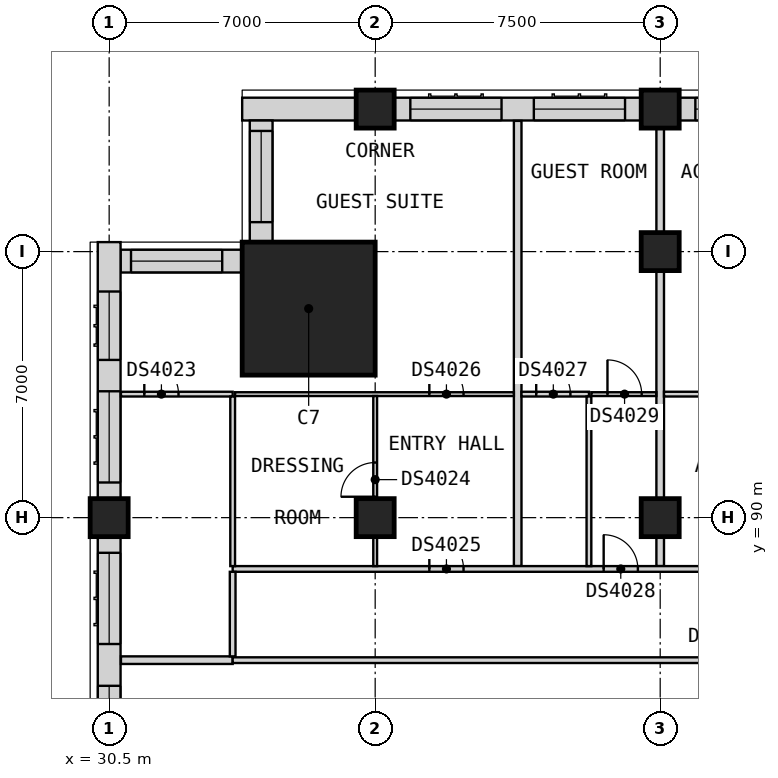
"""IFC4 building model, lengths in metres.
Left out: names, types, materials, properties, quantities, classifications, styles, units other than length and angle.
Written with IfcOpenShell. Run it as: python <this file> out.ifc"""

import sys

from ifc_helpers import new_model, si_unit, direction, frame, frame_2d, origin, origin_2d, place, context, subcontext, project, spatial, rectangle, extrude, element, fill, save


model = new_model("IFC4")
c1 = context("Model", 3, precision=1e-05, world=origin(), true_north=direction((0.0, 1.0)))
c2 = subcontext(c1, "Body", "Model", "MODEL_VIEW")
j1 = project(units=[si_unit("LENGTHUNIT", "METRE"), si_unit("PLANEANGLEUNIT", "RADIAN")], contexts=[c1])
p1 = place(None, origin())
s1 = spatial("IfcSite", under=j1, at=p1, CompositionType="ELEMENT")
p2 = place(p1, origin())
s2 = spatial("IfcBuilding", under=s1, at=p2, CompositionType="ELEMENT")
p3 = place(p2, frame((0.0, 0.0, 141.0)))
s3 = spatial("IfcBuildingStorey", under=s2, at=p3, CompositionType="ELEMENT", Elevation=141.0)
for number, where, z_axis, x_axis in (
    (1, (37.5, 100.75, 0.0), (0.0, 0.0, 1.0), (1.0, 0.0, 0.0)),
    (2, (45.0, 100.75, 0.0), (0.0, 0.0, 1.0), (1.0, 0.0, 0.0)),
    (3, (30.5, 90.0, 0.0), (0.0, 0.0, 1.0), (1.0, 0.0, 0.0)),
    (4, (37.5, 90.0, 0.0), (0.0, 0.0, 1.0), (1.0, 0.0, 0.0)),
    (5, (45.0, 90.0, 0.0), (0.0, 0.0, 1.0), (1.0, 0.0, 0.0)),
    (6, (45.0, 97.0, 0.0), (0.0, 0.0, 1.0), (1.0, 0.0, 0.0)),
):
    element("IfcColumn", number, at=place(p3, frame(where, z_axis=z_axis, x_axis=x_axis)), inside=s3, PredefinedType="COLUMN", context=c2, shape_type="SweptSolid", body=[
        extrude(rectangle(XDim=1.0, YDim=1.0, at=origin_2d()), origin(), (0.0, 0.0, 1.0), 3.6),
    ])
p4 = place(p3, frame((35.75, 95.5, 0.0), z_axis=(0.0, 0.0, 1.0), x_axis=(1.0, 0.0, 0.0)))
e7 = element("IfcColumn", 7, at=p4, inside=s3, PredefinedType="COLUMN", context=c2, shape_type="SweptSolid", body=[
    extrude(rectangle(XDim=3.5, YDim=3.5, at=origin_2d()), origin(), (0.0, 0.0, 1.0), 3.6),
])
p5 = place(p3, frame((52.0, 100.75, 0.0), z_axis=(0.0, 0.0, 1.0), x_axis=(-1.0, 0.0, 0.0)))
e8 = element("IfcWall", 8, at=p5, inside=s3, PredefinedType="SOLIDWALL", context=c2, shape_type="SweptSolid", body=[
    extrude(rectangle(XDim=6.5, YDim=0.6, at=frame_2d((3.25, 0.0))), origin(), (0.0, 0.0, 1.0), 2.85),
])
p6 = place(p5, frame((3.675, 0.0, 0.8)))
e9 = element("IfcOpeningElement", 9, at=p6, cuts=e8, PredefinedType="OPENING", context=c2, shape_type="SweptSolid", body=[
    extrude(rectangle(XDim=2.4, YDim=1.8, at=frame_2d((1.2, 0.9))), frame((0.0, 0.31, 0.0), z_axis=(0.0, -1.0, 0.0), x_axis=(1.0, 0.0, 0.0)), (0.0, 0.0, 1.0), 0.62),
])
p7 = place(p5, frame((0.425, 0.0, 0.8)))
e10 = element("IfcOpeningElement", 10, at=p7, cuts=e8, PredefinedType="OPENING", context=c2, shape_type="SweptSolid", body=[
    extrude(rectangle(XDim=2.4, YDim=1.8, at=frame_2d((1.2, 0.9))), frame((0.0, 0.31, 0.0), z_axis=(0.0, -1.0, 0.0), x_axis=(1.0, 0.0, 0.0)), (0.0, 0.0, 1.0), 0.62),
])
p8 = place(p3, frame((44.5, 100.75, 0.0), z_axis=(0.0, 0.0, 1.0), x_axis=(-1.0, 0.0, 0.0)))
e11 = element("IfcWall", 11, at=p8, inside=s3, PredefinedType="SOLIDWALL", context=c2, shape_type="SweptSolid", body=[
    extrude(rectangle(XDim=6.5, YDim=0.6, at=frame_2d((3.25, 0.0))), origin(), (0.0, 0.0, 1.0), 2.85),
])
p9 = place(p8, frame((3.675, 0.0, 0.8)))
e12 = element("IfcOpeningElement", 12, at=p9, cuts=e11, PredefinedType="OPENING", context=c2, shape_type="SweptSolid", body=[
    extrude(rectangle(XDim=2.4, YDim=1.8, at=frame_2d((1.2, 0.9))), frame((0.0, 0.31, 0.0), z_axis=(0.0, -1.0, 0.0), x_axis=(1.0, 0.0, 0.0)), (0.0, 0.0, 1.0), 0.62),
])
p10 = place(p8, frame((0.425, 0.0, 0.8)))
e13 = element("IfcOpeningElement", 13, at=p10, cuts=e11, PredefinedType="OPENING", context=c2, shape_type="SweptSolid", body=[
    extrude(rectangle(XDim=2.4, YDim=1.8, at=frame_2d((1.2, 0.9))), frame((0.0, 0.31, 0.0), z_axis=(0.0, -1.0, 0.0), x_axis=(1.0, 0.0, 0.0)), (0.0, 0.0, 1.0), 0.62),
])
p11 = place(p3, frame((37.0, 100.75, 0.0), z_axis=(0.0, 0.0, 1.0), x_axis=(-1.0, 0.0, 0.0)))
e14 = element("IfcWall", 14, at=p11, inside=s3, PredefinedType="SOLIDWALL", context=c2, shape_type="SweptSolid", body=[
    extrude(rectangle(XDim=3.0, YDim=0.6, at=frame_2d((1.5, 0.0))), origin(), (0.0, 0.0, 1.0), 3.35),
])
p12 = place(p3, frame((34.5, 100.45, 0.0), z_axis=(0.0, 0.0, 1.0), x_axis=(0.0, -1.0, 0.0)))
e15 = element("IfcWall", 15, at=p12, inside=s3, PredefinedType="SOLIDWALL", context=c2, shape_type="SweptSolid", body=[
    extrude(rectangle(XDim=3.2, YDim=0.6, at=frame_2d((1.6, 0.0))), origin(), (0.0, 0.0, 1.0), 3.35),
])
p13 = place(p12, frame((0.275, 0.0, 0.8)))
e16 = element("IfcOpeningElement", 16, at=p13, cuts=e15, PredefinedType="OPENING", context=c2, shape_type="SweptSolid", body=[
    extrude(rectangle(XDim=2.4, YDim=1.8, at=frame_2d((1.2, 0.9))), frame((0.0, 0.31, 0.0), z_axis=(0.0, -1.0, 0.0), x_axis=(1.0, 0.0, 0.0)), (0.0, 0.0, 1.0), 0.62),
])
p14 = place(p3, frame((34.0, 96.75, 0.0), z_axis=(0.0, 0.0, 1.0), x_axis=(-1.0, 0.0, 0.0)))
e17 = element("IfcWall", 17, at=p14, inside=s3, PredefinedType="SOLIDWALL", context=c2, shape_type="SweptSolid", body=[
    extrude(rectangle(XDim=3.2, YDim=0.6, at=frame_2d((1.6, 0.0))), origin(), (0.0, 0.0, 1.0), 3.35),
])
p15 = place(p14, frame((0.525, 0.0, 0.8)))
e18 = element("IfcOpeningElement", 18, at=p15, cuts=e17, PredefinedType="OPENING", context=c2, shape_type="SweptSolid", body=[
    extrude(rectangle(XDim=2.4, YDim=1.8, at=frame_2d((1.2, 0.9))), frame((0.0, 0.31, 0.0), z_axis=(0.0, -1.0, 0.0), x_axis=(1.0, 0.0, 0.0)), (0.0, 0.0, 1.0), 0.62),
])
p16 = place(p3, frame((30.5, 97.25, 0.0), z_axis=(0.0, 0.0, 1.0), x_axis=(0.0, -1.0, 0.0)))
e19 = element("IfcWall", 19, at=p16, inside=s3, PredefinedType="SOLIDWALL", context=c2, shape_type="SweptSolid", body=[
    extrude(rectangle(XDim=6.75, YDim=0.6, at=frame_2d((3.375, 0.0))), origin(), (0.0, 0.0, 1.0), 2.85),
])
p17 = place(p16, frame((3.925, 0.0, 0.8)))
e20 = element("IfcOpeningElement", 20, at=p17, cuts=e19, PredefinedType="OPENING", context=c2, shape_type="SweptSolid", body=[
    extrude(rectangle(XDim=2.4, YDim=1.8, at=frame_2d((1.2, 0.9))), frame((0.0, 0.31, 0.0), z_axis=(0.0, -1.0, 0.0), x_axis=(1.0, 0.0, 0.0)), (0.0, 0.0, 1.0), 0.62),
])
p18 = place(p16, frame((1.3, 0.0, 0.8)))
e21 = element("IfcOpeningElement", 21, at=p18, cuts=e19, PredefinedType="OPENING", context=c2, shape_type="SweptSolid", body=[
    extrude(rectangle(XDim=1.8, YDim=1.8, at=frame_2d((0.9, 0.9))), frame((0.0, 0.31, 0.0), z_axis=(0.0, -1.0, 0.0), x_axis=(1.0, 0.0, 0.0)), (0.0, 0.0, 1.0), 0.62),
])
p19 = place(p3, frame((30.5, 89.5, 0.0), z_axis=(0.0, 0.0, 1.0), x_axis=(0.0, -1.0, 0.0)))
e22 = element("IfcWall", 22, at=p19, inside=s3, PredefinedType="SOLIDWALL", context=c2, shape_type="SweptSolid", body=[
    extrude(rectangle(XDim=7.0, YDim=0.6, at=frame_2d((3.5, 0.0))), origin(), (0.0, 0.0, 1.0), 3.35),
])
p20 = place(p19, frame((3.925, 0.0, 0.8)))
e23 = element("IfcOpeningElement", 23, at=p20, cuts=e22, PredefinedType="OPENING", context=c2, shape_type="SweptSolid", body=[
    extrude(rectangle(XDim=2.4, YDim=1.8, at=frame_2d((1.2, 0.9))), frame((0.0, 0.31, 0.0), z_axis=(0.0, -1.0, 0.0), x_axis=(1.0, 0.0, 0.0)), (0.0, 0.0, 1.0), 0.62),
])
p21 = place(p19, frame((0.425, 0.0, 0.8)))
e24 = element("IfcOpeningElement", 24, at=p21, cuts=e22, PredefinedType="OPENING", context=c2, shape_type="SweptSolid", body=[
    extrude(rectangle(XDim=2.4, YDim=1.8, at=frame_2d((1.2, 0.9))), frame((0.0, 0.31, 0.0), z_axis=(0.0, -1.0, 0.0), x_axis=(1.0, 0.0, 0.0)), (0.0, 0.0, 1.0), 0.62),
])
p22 = place(p3, frame((30.81, 86.25, 0.0), z_axis=(0.0, 0.0, 1.0), x_axis=(1.0, 0.0, 0.0)))
e25 = element("IfcWall", 25, at=p22, inside=s3, PredefinedType="PARTITIONING", context=c2, shape_type="SweptSolid", body=[
    extrude(rectangle(XDim=2.94, YDim=0.2, at=frame_2d((1.47, 0.0))), origin(), (0.0, 0.0, 1.0), 3.35),
])
p23 = place(p3, frame((41.25, 88.725, 0.0), z_axis=(0.0, 0.0, 1.0), x_axis=(0.0, 1.0, 0.0)))
e26 = element("IfcWall", 26, at=p23, inside=s3, PredefinedType="PARTITIONING", context=c2, shape_type="SweptSolid", body=[
    extrude(rectangle(XDim=11.715, YDim=0.2, at=frame_2d((5.857, 0.0))), origin(), (0.0, 0.0, 1.0), 3.35),
])
p24 = place(p3, frame((45.0, 88.725, 0.0), z_axis=(0.0, 0.0, 1.0), x_axis=(0.0, 1.0, 0.0)))
e27 = element("IfcWall", 27, at=p24, inside=s3, PredefinedType="PARTITIONING", context=c2, shape_type="SweptSolid", body=[
    extrude(rectangle(XDim=12.525, YDim=0.2, at=frame_2d((6.262, 0.0))), origin(), (0.0, 0.0, 1.0), 3.35),
])
p25 = place(p3, frame((33.75, 86.25, 0.0), z_axis=(0.0, 0.0, 1.0), x_axis=(1.0, 0.0, 0.0)))
e28 = element("IfcWall", 28, at=p25, inside=s3, PredefinedType="PARTITIONING", context=c2, shape_type="SweptSolid", body=[
    extrude(rectangle(XDim=37.5, YDim=0.15, at=frame_2d((18.75, 0.0))), origin(), (0.0, 0.0, 1.0), 3.35),
])
p26 = place(p25, frame((12.45, 0.0, 0.0)))
e29 = element("IfcOpeningElement", 29, at=p26, cuts=e28, PredefinedType="OPENING", context=c2, shape_type="SweptSolid", body=[
    extrude(rectangle(XDim=0.9, YDim=2.1, at=frame_2d((0.45, 1.05))), frame((0.0, 0.085, 0.0), z_axis=(0.0, -1.0, 0.0), x_axis=(1.0, 0.0, 0.0)), (0.0, 0.0, 1.0), 0.17),
])
p27 = place(p25, frame((27.225, 0.0, 0.0)))
e30 = element("IfcOpeningElement", 30, at=p27, cuts=e28, PredefinedType="OPENING", context=c2, shape_type="SweptSolid", body=[
    extrude(rectangle(XDim=0.9, YDim=2.1, at=frame_2d((0.45, 1.05))), frame((0.0, 0.085, 0.0), z_axis=(0.0, -1.0, 0.0), x_axis=(1.0, 0.0, 0.0)), (0.0, 0.0, 1.0), 0.17),
])
p28 = place(p3, frame((33.75, 88.65, 0.0), z_axis=(0.0, 0.0, 1.0), x_axis=(1.0, 0.0, 0.0)))
e31 = element("IfcWall", 31, at=p28, inside=s3, PredefinedType="PARTITIONING", context=c2, shape_type="SweptSolid", body=[
    extrude(rectangle(XDim=39.9, YDim=0.15, at=frame_2d((19.95, 0.0))), origin(), (0.0, 0.0, 1.0), 3.35),
])
p29 = place(p28, frame((5.175, 0.0, 0.0)))
e32 = element("IfcOpeningElement", 32, at=p29, cuts=e31, PredefinedType="OPENING", context=c2, shape_type="SweptSolid", body=[
    extrude(rectangle(XDim=0.9, YDim=2.1, at=frame_2d((0.45, 1.05))), frame((0.0, 0.085, 0.0), z_axis=(0.0, -1.0, 0.0), x_axis=(1.0, 0.0, 0.0)), (0.0, 0.0, 1.0), 0.17),
])
p30 = place(p28, frame((9.762, 0.0, 0.0)))
e33 = element("IfcOpeningElement", 33, at=p30, cuts=e31, PredefinedType="OPENING", context=c2, shape_type="SweptSolid", body=[
    extrude(rectangle(XDim=0.9, YDim=2.1, at=frame_2d((0.45, 1.05))), frame((0.0, 0.085, 0.0), z_axis=(0.0, -1.0, 0.0), x_axis=(1.0, 0.0, 0.0)), (0.0, 0.0, 1.0), 0.17),
])
p31 = place(p28, frame((16.938, 0.0, 0.0)))
e34 = element("IfcOpeningElement", 34, at=p31, cuts=e31, PredefinedType="OPENING", context=c2, shape_type="SweptSolid", body=[
    extrude(rectangle(XDim=1.0, YDim=2.1, at=frame_2d((0.5, 1.05))), frame((0.0, 0.085, 0.0), z_axis=(0.0, -1.0, 0.0), x_axis=(1.0, 0.0, 0.0)), (0.0, 0.0, 1.0), 0.17),
])
p32 = place(p28, frame((24.3, 0.0, 0.0)))
e35 = element("IfcOpeningElement", 35, at=p32, cuts=e31, PredefinedType="OPENING", context=c2, shape_type="SweptSolid", body=[
    extrude(rectangle(XDim=0.9, YDim=2.1, at=frame_2d((0.45, 1.05))), frame((0.0, 0.085, 0.0), z_axis=(0.0, -1.0, 0.0), x_axis=(1.0, 0.0, 0.0)), (0.0, 0.0, 1.0), 0.17),
])
p33 = place(p28, frame((36.113, 0.0, 0.0)))
e36 = element("IfcOpeningElement", 36, at=p33, cuts=e31, PredefinedType="OPENING", context=c2, shape_type="SweptSolid", body=[
    extrude(rectangle(XDim=0.9, YDim=2.1, at=frame_2d((0.45, 1.05))), frame((0.0, 0.085, 0.0), z_axis=(0.0, -1.0, 0.0), x_axis=(1.0, 0.0, 0.0)), (0.0, 0.0, 1.0), 0.17),
])
p34 = place(p28, frame((38.25, 0.0, 0.0)))
e37 = element("IfcOpeningElement", 37, at=p34, cuts=e31, PredefinedType="OPENING", context=c2, shape_type="SweptSolid", body=[
    extrude(rectangle(XDim=0.9, YDim=2.1, at=frame_2d((0.45, 1.05))), frame((0.0, 0.085, 0.0), z_axis=(0.0, -1.0, 0.0), x_axis=(1.0, 0.0, 0.0)), (0.0, 0.0, 1.0), 0.17),
])
p35 = place(p3, frame((33.75, 86.35, 0.0), z_axis=(0.0, 0.0, 1.0), x_axis=(0.0, 1.0, 0.0)))
e38 = element("IfcWall", 38, at=p35, inside=s3, PredefinedType="PARTITIONING", context=c2, shape_type="SweptSolid", body=[
    extrude(rectangle(XDim=2.225, YDim=0.15, at=frame_2d((1.112, 0.0))), origin(), (0.0, 0.0, 1.0), 3.35),
])
p36 = place(p3, frame((33.812, 93.25, 0.0), z_axis=(0.0, 0.0, 1.0), x_axis=(1.0, 0.0, 0.0)))
e39 = element("IfcWall", 39, at=p36, inside=s3, PredefinedType="PARTITIONING", context=c2, shape_type="SweptSolid", body=[
    extrude(rectangle(XDim=7.337, YDim=0.1, at=frame_2d((3.669, 0.0))), origin(), (0.0, 0.0, 1.0), 3.35),
])
p37 = place(p36, frame((5.113, 0.0, 0.0)))
e40 = element("IfcOpeningElement", 40, at=p37, cuts=e39, PredefinedType="OPENING", context=c2, shape_type="SweptSolid", body=[
    extrude(rectangle(XDim=0.9, YDim=2.1, at=frame_2d((0.45, 1.05))), frame((0.0, 0.06, 0.0), z_axis=(0.0, -1.0, 0.0), x_axis=(1.0, 0.0, 0.0)), (0.0, 0.0, 1.0), 0.12),
])
p38 = place(p3, frame((43.188, 93.25, 0.0), z_axis=(0.0, 0.0, 1.0), x_axis=(1.0, 0.0, 0.0)))
e41 = element("IfcWall", 41, at=p38, inside=s3, PredefinedType="PARTITIONING", context=c2, shape_type="SweptSolid", body=[
    extrude(rectangle(XDim=1.712, YDim=0.1, at=frame_2d((0.856, 0.0))), origin(), (0.0, 0.0, 1.0), 3.35),
])
p39 = place(p38, frame((0.425, 0.0, 0.0)))
e42 = element("IfcOpeningElement", 42, at=p39, cuts=e41, PredefinedType="OPENING", context=c2, shape_type="SweptSolid", body=[
    extrude(rectangle(XDim=0.9, YDim=2.1, at=frame_2d((0.45, 1.05))), frame((0.0, 0.06, 0.0), z_axis=(0.0, -1.0, 0.0), x_axis=(1.0, 0.0, 0.0)), (0.0, 0.0, 1.0), 0.12),
])
p40 = place(p3, frame((37.5, 88.725, 0.0), z_axis=(0.0, 0.0, 1.0), x_axis=(0.0, 1.0, 0.0)))
e43 = element("IfcWall", 43, at=p40, inside=s3, PredefinedType="PARTITIONING", context=c2, shape_type="SweptSolid", body=[
    extrude(rectangle(XDim=4.475, YDim=0.1, at=frame_2d((2.237, 0.0))), origin(), (0.0, 0.0, 1.0), 3.35),
])
p41 = place(p40, frame((1.825, 0.0, 0.0)))
e44 = element("IfcOpeningElement", 44, at=p41, cuts=e43, PredefinedType="OPENING", context=c2, shape_type="SweptSolid", body=[
    extrude(rectangle(XDim=0.9, YDim=2.1, at=frame_2d((0.45, 1.05))), frame((0.0, 0.06, 0.0), z_axis=(0.0, -1.0, 0.0), x_axis=(1.0, 0.0, 0.0)), (0.0, 0.0, 1.0), 0.12),
])
p42 = place(p3, frame((30.81, 93.25, 0.0), z_axis=(0.0, 0.0, 1.0), x_axis=(1.0, 0.0, 0.0)))
e45 = element("IfcWall", 45, at=p42, inside=s3, PredefinedType="PARTITIONING", context=c2, shape_type="SweptSolid", body=[
    extrude(rectangle(XDim=2.94, YDim=0.125, at=frame_2d((1.47, 0.0))), origin(), (0.0, 0.0, 1.0), 3.35),
])
p43 = place(p42, frame((0.615, 0.0, 0.0)))
e46 = element("IfcOpeningElement", 46, at=p43, cuts=e45, PredefinedType="OPENING", context=c2, shape_type="SweptSolid", body=[
    extrude(rectangle(XDim=0.9, YDim=2.1, at=frame_2d((0.45, 1.05))), frame((0.0, 0.073, 0.0), z_axis=(0.0, -1.0, 0.0), x_axis=(1.0, 0.0, 0.0)), (0.0, 0.0, 1.0), 0.145),
])
p44 = place(p3, frame((41.35, 93.25, 0.0), z_axis=(0.0, 0.0, 1.0), x_axis=(1.0, 0.0, 0.0)))
e47 = element("IfcWall", 47, at=p44, inside=s3, PredefinedType="PARTITIONING", context=c2, shape_type="SweptSolid", body=[
    extrude(rectangle(XDim=1.775, YDim=0.125, at=frame_2d((0.887, 0.0))), origin(), (0.0, 0.0, 1.0), 3.35),
])
p45 = place(p44, frame((0.387, 0.0, 0.0)))
e48 = element("IfcOpeningElement", 48, at=p45, cuts=e47, PredefinedType="OPENING", context=c2, shape_type="SweptSolid", body=[
    extrude(rectangle(XDim=0.9, YDim=2.1, at=frame_2d((0.45, 1.05))), frame((0.0, 0.073, 0.0), z_axis=(0.0, -1.0, 0.0), x_axis=(1.0, 0.0, 0.0)), (0.0, 0.0, 1.0), 0.145),
])
p46 = place(p3, frame((45.1, 93.25, 0.0), z_axis=(0.0, 0.0, 1.0), x_axis=(1.0, 0.0, 0.0)))
e49 = element("IfcWall", 49, at=p46, inside=s3, PredefinedType="PARTITIONING", context=c2, shape_type="SweptSolid", body=[
    extrude(rectangle(XDim=4.775, YDim=0.125, at=frame_2d((2.387, 0.0))), origin(), (0.0, 0.0, 1.0), 3.35),
])
p47 = place(p46, frame((1.837, 0.0, 0.0)))
e50 = element("IfcOpeningElement", 50, at=p47, cuts=e49, PredefinedType="OPENING", context=c2, shape_type="SweptSolid", body=[
    extrude(rectangle(XDim=1.0, YDim=2.1, at=frame_2d((0.5, 1.05))), frame((0.0, 0.073, 0.0), z_axis=(0.0, -1.0, 0.0), x_axis=(1.0, 0.0, 0.0)), (0.0, 0.0, 1.0), 0.145),
])
for number, where, z_axis, x_axis in (
    (51, (33.75, 88.725, 0.0), (0.0, 0.0, 1.0), (0.0, 1.0, 0.0)),
    (52, (43.125, 88.725, 0.0), (0.0, 0.0, 1.0), (0.0, 1.0, 0.0)),
):
    element("IfcWall", number, at=place(p3, frame(where, z_axis=z_axis, x_axis=x_axis)), inside=s3, PredefinedType="PARTITIONING", context=c2, shape_type="SweptSolid", body=[
        extrude(rectangle(XDim=4.462, YDim=0.125, at=frame_2d((2.231, 0.0))), origin(), (0.0, 0.0, 1.0), 3.35),
    ])
p48 = place(p6, origin())
e53 = element("IfcWindow", 53, at=p48, inside=s3, PartitioningType="SINGLE_PANEL", PredefinedType="WINDOW", context=c2, shape_type="SweptSolid", body=[
    extrude(rectangle(XDim=2.4, YDim=1.8, at=frame_2d((1.2, 0.9))), frame((0.0, -0.07, 0.0), z_axis=(0.0, -1.0, 0.0), x_axis=(1.0, 0.0, 0.0)), (0.0, 0.0, 1.0), 0.06),
])
fill(e9, e53)
p49 = place(p9, origin())
e54 = element("IfcWindow", 54, at=p49, inside=s3, PartitioningType="SINGLE_PANEL", PredefinedType="WINDOW", context=c2, shape_type="SweptSolid", body=[
    extrude(rectangle(XDim=2.4, YDim=1.8, at=frame_2d((1.2, 0.9))), frame((0.0, -0.07, 0.0), z_axis=(0.0, -1.0, 0.0), x_axis=(1.0, 0.0, 0.0)), (0.0, 0.0, 1.0), 0.06),
])
fill(e12, e54)
p50 = place(p10, origin())
e55 = element("IfcWindow", 55, at=p50, inside=s3, PartitioningType="SINGLE_PANEL", PredefinedType="WINDOW", context=c2, shape_type="SweptSolid", body=[
    extrude(rectangle(XDim=2.4, YDim=1.8, at=frame_2d((1.2, 0.9))), frame((0.0, -0.07, 0.0), z_axis=(0.0, -1.0, 0.0), x_axis=(1.0, 0.0, 0.0)), (0.0, 0.0, 1.0), 0.06),
])
fill(e13, e55)
p51 = place(p13, origin())
e56 = element("IfcWindow", 56, at=p51, inside=s3, PartitioningType="SINGLE_PANEL", PredefinedType="WINDOW", context=c2, shape_type="SweptSolid", body=[
    extrude(rectangle(XDim=2.4, YDim=1.8, at=frame_2d((1.2, 0.9))), frame((0.0, -0.07, 0.0), z_axis=(0.0, -1.0, 0.0), x_axis=(1.0, 0.0, 0.0)), (0.0, 0.0, 1.0), 0.06),
])
fill(e16, e56)
p52 = place(p15, origin())
e57 = element("IfcWindow", 57, at=p52, inside=s3, PartitioningType="SINGLE_PANEL", PredefinedType="WINDOW", context=c2, shape_type="SweptSolid", body=[
    extrude(rectangle(XDim=2.4, YDim=1.8, at=frame_2d((1.2, 0.9))), frame((0.0, -0.07, 0.0), z_axis=(0.0, -1.0, 0.0), x_axis=(1.0, 0.0, 0.0)), (0.0, 0.0, 1.0), 0.06),
])
fill(e18, e57)
p53 = place(p17, origin())
e58 = element("IfcWindow", 58, at=p53, inside=s3, PartitioningType="SINGLE_PANEL", PredefinedType="WINDOW", context=c2, shape_type="SweptSolid", body=[
    extrude(rectangle(XDim=2.4, YDim=1.8, at=frame_2d((1.2, 0.9))), frame((0.0, -0.07, 0.0), z_axis=(0.0, -1.0, 0.0), x_axis=(1.0, 0.0, 0.0)), (0.0, 0.0, 1.0), 0.06),
])
fill(e20, e58)
p54 = place(p18, origin())
e59 = element("IfcWindow", 59, at=p54, inside=s3, PartitioningType="SINGLE_PANEL", PredefinedType="WINDOW", context=c2, shape_type="SweptSolid", body=[
    extrude(rectangle(XDim=1.8, YDim=1.8, at=frame_2d((0.9, 0.9))), frame((0.0, -0.07, 0.0), z_axis=(0.0, -1.0, 0.0), x_axis=(1.0, 0.0, 0.0)), (0.0, 0.0, 1.0), 0.06),
])
fill(e21, e59)
p55 = place(p20, origin())
e60 = element("IfcWindow", 60, at=p55, inside=s3, PartitioningType="SINGLE_PANEL", PredefinedType="WINDOW", context=c2, shape_type="SweptSolid", body=[
    extrude(rectangle(XDim=2.4, YDim=1.8, at=frame_2d((1.2, 0.9))), frame((0.0, -0.07, 0.0), z_axis=(0.0, -1.0, 0.0), x_axis=(1.0, 0.0, 0.0)), (0.0, 0.0, 1.0), 0.06),
])
fill(e23, e60)
p56 = place(p21, origin())
e61 = element("IfcWindow", 61, at=p56, inside=s3, PartitioningType="SINGLE_PANEL", PredefinedType="WINDOW", context=c2, shape_type="SweptSolid", body=[
    extrude(rectangle(XDim=2.4, YDim=1.8, at=frame_2d((1.2, 0.9))), frame((0.0, -0.07, 0.0), z_axis=(0.0, -1.0, 0.0), x_axis=(1.0, 0.0, 0.0)), (0.0, 0.0, 1.0), 0.06),
])
fill(e24, e61)
p57 = place(p43, origin())
e62 = element("IfcDoor", 62, at=p57, inside=s3, OperationType="SINGLE_SWING_RIGHT", PredefinedType="DOOR", context=c2, shape_type="SweptSolid", body=[
    extrude(rectangle(XDim=0.9, YDim=2.1, at=frame_2d((0.45, 1.05))), frame((0.0, 0.025, 0.0), z_axis=(0.0, -1.0, 0.0), x_axis=(1.0, 0.0, 0.0)), (0.0, 0.0, 1.0), 0.05),
])
fill(e46, e62)
p58 = place(p41, origin())
e63 = element("IfcDoor", 63, at=p58, inside=s3, OperationType="SINGLE_SWING_RIGHT", PredefinedType="DOOR", context=c2, shape_type="SweptSolid", body=[
    extrude(rectangle(XDim=0.9, YDim=2.1, at=frame_2d((0.45, 1.05))), frame((0.0, 0.025, 0.0), z_axis=(0.0, -1.0, 0.0), x_axis=(1.0, 0.0, 0.0)), (0.0, 0.0, 1.0), 0.05),
])
fill(e44, e63)
p59 = place(p29, origin())
e64 = element("IfcDoor", 64, at=p59, inside=s3, OperationType="SINGLE_SWING_LEFT", PredefinedType="DOOR", context=c2, shape_type="SweptSolid", body=[
    extrude(rectangle(XDim=0.9, YDim=2.1, at=frame_2d((0.45, 1.05))), frame((0.0, 0.025, 0.0), z_axis=(0.0, -1.0, 0.0), x_axis=(1.0, 0.0, 0.0)), (0.0, 0.0, 1.0), 0.05),
])
fill(e32, e64)
p60 = place(p37, origin())
e65 = element("IfcDoor", 65, at=p60, inside=s3, OperationType="SINGLE_SWING_RIGHT", PredefinedType="DOOR", context=c2, shape_type="SweptSolid", body=[
    extrude(rectangle(XDim=0.9, YDim=2.1, at=frame_2d((0.45, 1.05))), frame((0.0, 0.025, 0.0), z_axis=(0.0, -1.0, 0.0), x_axis=(1.0, 0.0, 0.0)), (0.0, 0.0, 1.0), 0.05),
])
fill(e40, e65)
p61 = place(p45, origin())
e66 = element("IfcDoor", 66, at=p61, inside=s3, OperationType="SINGLE_SWING_RIGHT", PredefinedType="DOOR", context=c2, shape_type="SweptSolid", body=[
    extrude(rectangle(XDim=0.9, YDim=2.1, at=frame_2d((0.45, 1.05))), frame((0.0, 0.025, 0.0), z_axis=(0.0, -1.0, 0.0), x_axis=(1.0, 0.0, 0.0)), (0.0, 0.0, 1.0), 0.05),
])
fill(e48, e66)
p62 = place(p30, origin())
e67 = element("IfcDoor", 67, at=p62, inside=s3, OperationType="SINGLE_SWING_LEFT", PredefinedType="DOOR", context=c2, shape_type="SweptSolid", body=[
    extrude(rectangle(XDim=0.9, YDim=2.1, at=frame_2d((0.45, 1.05))), frame((0.0, 0.025, 0.0), z_axis=(0.0, -1.0, 0.0), x_axis=(1.0, 0.0, 0.0)), (0.0, 0.0, 1.0), 0.05),
])
fill(e33, e67)
p63 = place(p39, origin())
e68 = element("IfcDoor", 68, at=p63, inside=s3, OperationType="SINGLE_SWING_RIGHT", PredefinedType="DOOR", context=c2, shape_type="SweptSolid", body=[
    extrude(rectangle(XDim=0.9, YDim=2.1, at=frame_2d((0.45, 1.05))), frame((0.0, 0.025, 0.0), z_axis=(0.0, -1.0, 0.0), x_axis=(1.0, 0.0, 0.0)), (0.0, 0.0, 1.0), 0.05),
])
fill(e42, e68)
save(model, sys.argv[1])
